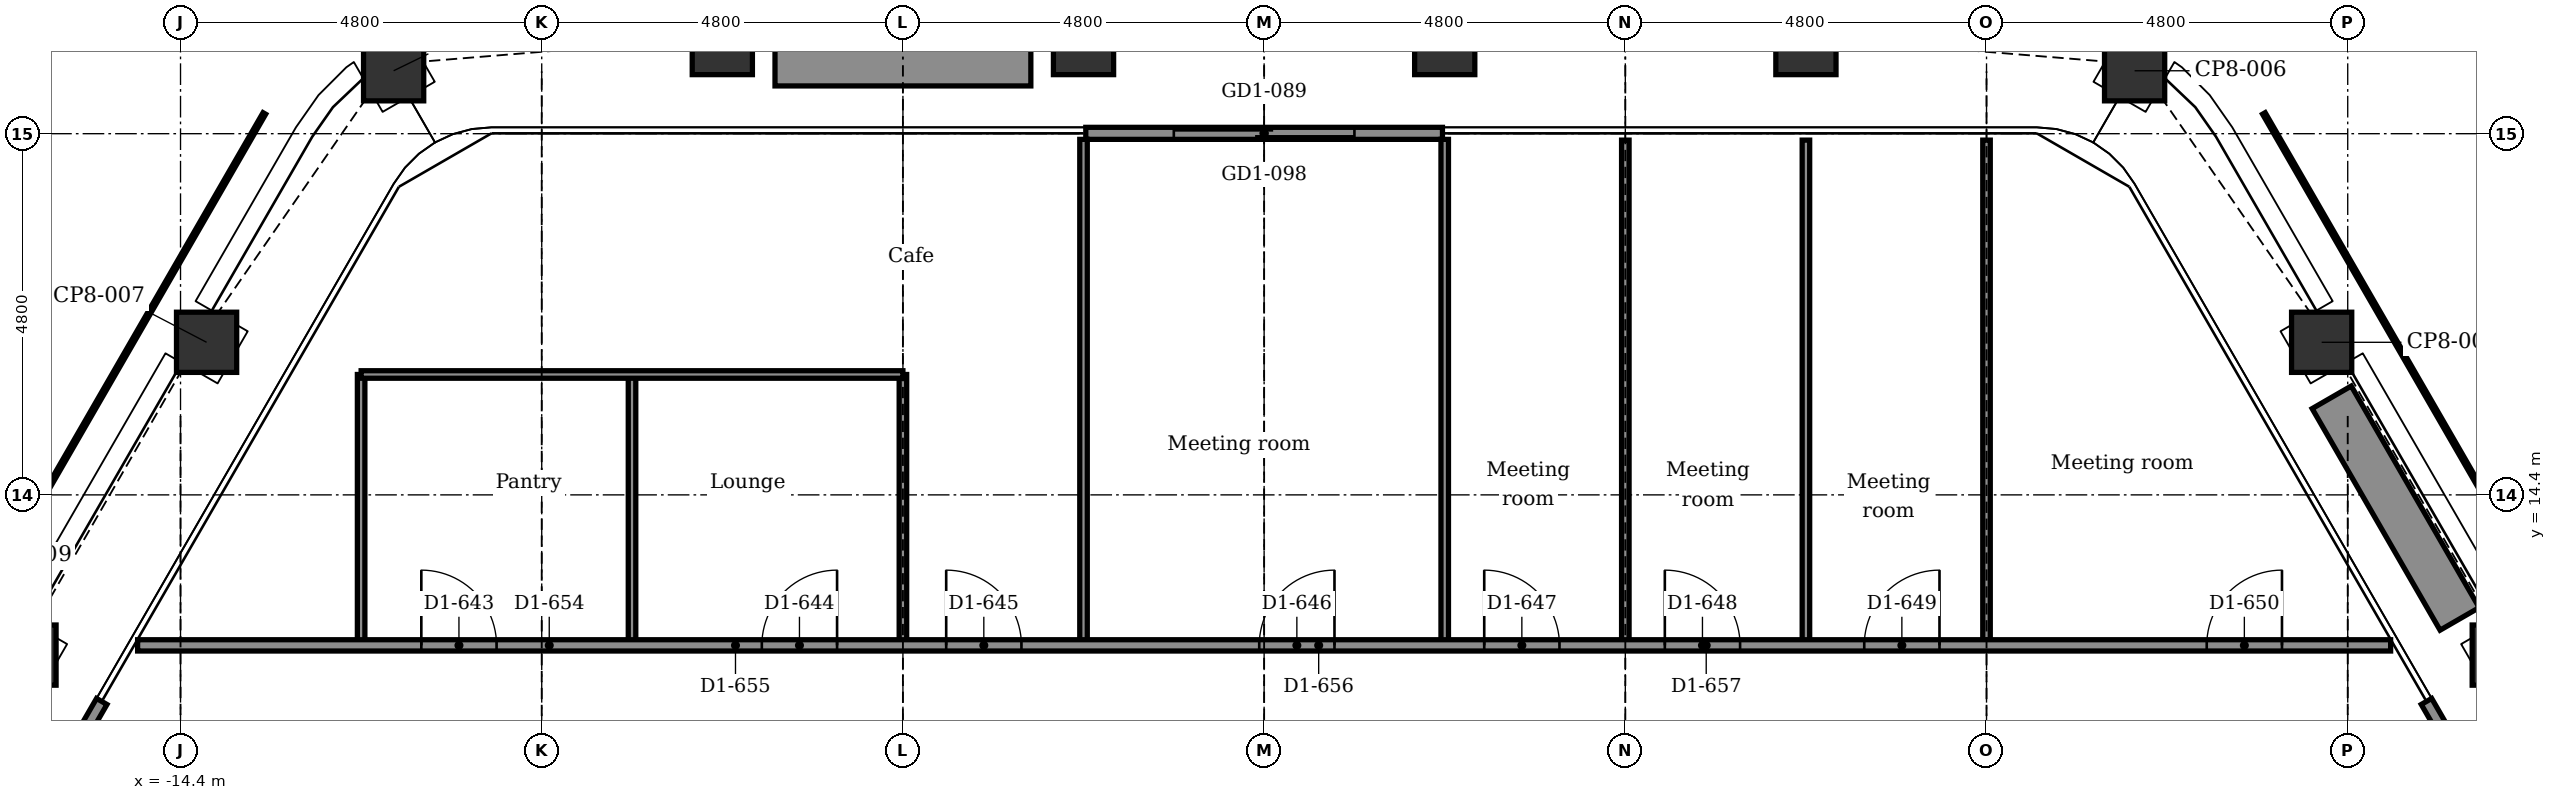
"""IFC4 building model, lengths in metres.
Left out: names, types, materials, properties, quantities, classifications, styles, units other than length and angle.
Written with IfcOpenShell. Run it as: python <this file> out.ifc"""

import sys

from ifc_helpers import new_model, si_unit, direction, frame, frame_2d, origin, origin_2d, place, context, subcontext, project, spatial, rectangle, extrude, element, fill, save


model = new_model("IFC4")
c1 = context("Model", 3, precision=1e-05, world=origin(), true_north=direction((0.0, 1.0)))
c2 = subcontext(c1, "Body", "Model", "MODEL_VIEW")
j1 = project(units=[si_unit("LENGTHUNIT", "METRE"), si_unit("PLANEANGLEUNIT", "RADIAN")], contexts=[c1])
p1 = place(None, origin())
s1 = spatial("IfcSite", under=j1, at=p1, CompositionType="ELEMENT")
p2 = place(p1, origin())
s2 = spatial("IfcBuilding", under=s1, at=p2, CompositionType="ELEMENT")
p3 = place(p2, frame((0.0, 0.0, 226.7)))
s3 = spatial("IfcBuildingStorey", under=s2, at=p3, CompositionType="ELEMENT", Elevation=226.7)
for number, where, z_axis, x_axis in (
    (1, (-11.568, 20.036, -0.15), (0.0, 0.0, 1.0), (0.866, 0.5, 0.0)),
    (2, (-7.2, 20.385, -0.15), (0.0, 0.0, 1.0), (1.0, 0.0, 0.0)),
    (3, (-2.4, 20.385, -0.15), (0.0, 0.0, 1.0), (1.0, 0.0, 0.0)),
    (4, (2.4, 20.385, -0.15), (0.0, 0.0, 1.0), (1.0, 0.0, 0.0)),
    (5, (7.2, 20.385, -0.15), (0.0, 0.0, 1.0), (1.0, 0.0, 0.0)),
    (6, (11.568, 20.036, -0.15), (0.0, 0.0, 1.0), (0.5, 0.866, 0.0)),
    (7, (14.054, 16.428, -0.15), (0.0, 0.0, 1.0), (0.866, 0.5, 0.0)),
    (8, (16.454, 12.271, -0.15), (0.0, 0.0, 1.0), (0.866, 0.5, 0.0)),
    (9, (-16.454, 12.271, -0.15), (0.0, 0.0, 1.0), (0.5, 0.866, 0.0)),
    (10, (-14.054, 16.428, -0.15), (0.0, 0.0, 1.0), (0.5, 0.866, 0.0)),
):
    element("IfcColumn", number, at=place(p3, frame(where, z_axis=z_axis, x_axis=x_axis)), inside=s3, PredefinedType="COLUMN", context=c2, shape_type="SweptSolid", body=[
        extrude(rectangle(XDim=0.8, YDim=0.8, at=origin_2d()), origin(), (0.0, 0.0, 1.0), 3.9),
    ])
p4 = place(p3, frame((-2.37, 19.205, 0.0), z_axis=(0.0, 0.0, 1.0), x_axis=(1.0, 0.0, 0.0)))
e11 = element("IfcWall", 11, at=p4, inside=s3, PredefinedType="PARTITIONING", context=c2, shape_type="SweptSolid", body=[
    extrude(rectangle(XDim=4.74, YDim=0.16, at=frame_2d((2.37, 0.0))), origin(), (0.0, 0.0, 1.0), 3.75),
])
p5 = place(p4, frame((1.17, 0.0, 0.0)))
e12 = element("IfcOpeningElement", 12, at=p5, cuts=e11, PredefinedType="OPENING", context=c2, shape_type="SweptSolid", body=[
    extrude(rectangle(XDim=2.4, YDim=2.4, at=frame_2d((1.2, 1.2))), frame((0.0, 0.09, 0.0), z_axis=(0.0, -1.0, 0.0), x_axis=(1.0, 0.0, 0.0)), (0.0, 0.0, 1.0), 0.18),
])
p6 = place(p3, frame((15.447, 11.655, 0.0), z_axis=(0.0, 0.0, 1.0), x_axis=(0.499978080042, -0.866038058908, 0.0)))
e13 = element("IfcWall", 13, at=p6, inside=s3, PredefinedType="PARTITIONING", context=c2, shape_type="SweptSolid", body=[
    extrude(rectangle(XDim=4.74, YDim=0.16, at=frame_2d((2.37, 0.0))), origin(), (0.0, 0.0, 1.0), 3.75),
])
p7 = place(p6, frame((1.17, 0.0, 0.0)))
e14 = element("IfcOpeningElement", 14, at=p7, cuts=e13, PredefinedType="OPENING", context=c2, shape_type="SweptSolid", body=[
    extrude(rectangle(XDim=2.4, YDim=2.4, at=frame_2d((1.2, 1.2))), frame((0.0, 0.09, 0.0), z_axis=(0.0, -1.0, 0.0), x_axis=(1.0, 0.0, 0.0)), (0.0, 0.0, 1.0), 0.18),
])
p8 = place(p3, frame((-17.817, 7.55, 0.0), z_axis=(0.0, 0.0, 1.0), x_axis=(0.499978080042, 0.866038058908, 0.0)))
e15 = element("IfcWall", 15, at=p8, inside=s3, PredefinedType="PARTITIONING", context=c2, shape_type="SweptSolid", body=[
    extrude(rectangle(XDim=4.74, YDim=0.16, at=frame_2d((2.37, 0.0))), origin(), (0.0, 0.0, 1.0), 3.75),
])
p9 = place(p8, frame((1.17, 0.0, 0.0)))
e16 = element("IfcOpeningElement", 16, at=p9, cuts=e15, PredefinedType="OPENING", context=c2, shape_type="SweptSolid", body=[
    extrude(rectangle(XDim=2.4, YDim=2.4, at=frame_2d((1.2, 1.2))), frame((0.0, 0.09, 0.0), z_axis=(0.0, -1.0, 0.0), x_axis=(1.0, 0.0, 0.0)), (0.0, 0.0, 1.0), 0.18),
])
p10 = place(p3, frame((-6.5, 20.135, 0.0), z_axis=(0.0, 0.0, 1.0), x_axis=(1.0, 0.0, 0.0)))
e17 = element("IfcWall", 17, at=p10, inside=s3, PredefinedType="USERDEFINED", context=c2, shape_type="SweptSolid", body=[
    extrude(rectangle(XDim=3.4, YDim=0.6, at=frame_2d((1.7, 0.0))), origin(), (0.0, 0.0, 1.0), 0.7),
])
p11 = place(p3, frame((14.187, 15.697, 0.0), z_axis=(0.0, 0.0, 1.0), x_axis=(0.499977295307, -0.866038511948, 0.0)))
e18 = element("IfcWall", 18, at=p11, inside=s3, PredefinedType="USERDEFINED", context=c2, shape_type="SweptSolid", body=[
    extrude(rectangle(XDim=3.4, YDim=0.6, at=frame_2d((1.7, 0.0))), origin(), (0.0, 0.0, 1.0), 0.7),
])
p12 = place(p3, frame((9.6, 12.4, 0.0), z_axis=(0.0, 0.0, 1.0), x_axis=(0.0, 1.0, 0.0)))
e19 = element("IfcWall", 19, at=p12, inside=s3, PredefinedType="PARTITIONING", context=c2, shape_type="SweptSolid", body=[
    extrude(rectangle(XDim=6.715, YDim=0.1, at=frame_2d((3.357, 0.0))), origin(), (0.0, 0.0, 1.0), 3.217),
])
p13 = place(p3, frame((7.2, 12.4, 0.0), z_axis=(0.0, 0.0, 1.0), x_axis=(0.0, 1.0, 0.0)))
e20 = element("IfcWall", 20, at=p13, inside=s3, PredefinedType="PARTITIONING", context=c2, shape_type="SweptSolid", body=[
    extrude(rectangle(XDim=6.715, YDim=0.1, at=frame_2d((3.357, 0.0))), origin(), (0.0, 0.0, 1.0), 3.75),
])
p14 = place(p3, frame((4.8, 12.4, 0.0), z_axis=(0.0, 0.0, 1.0), x_axis=(0.0, 1.0, 0.0)))
e21 = element("IfcWall", 21, at=p14, inside=s3, PredefinedType="PARTITIONING", context=c2, shape_type="SweptSolid", body=[
    extrude(rectangle(XDim=6.715, YDim=0.1, at=frame_2d((3.357, 0.0))), origin(), (0.0, 0.0, 1.0), 3.217),
])
for number, where, z_axis, x_axis in (
    (22, (2.4, 12.4, 0.0), (0.0, 0.0, 1.0), (0.0, 1.0, 0.0)),
    (23, (-2.4, 12.4, 0.0), (0.0, 0.0, 1.0), (0.0, 1.0, 0.0)),
):
    element("IfcWall", number, at=place(p3, frame(where, z_axis=z_axis, x_axis=x_axis)), inside=s3, PredefinedType="PARTITIONING", context=c2, shape_type="SweptSolid", body=[
        extrude(rectangle(XDim=6.725, YDim=0.1, at=frame_2d((3.362, 0.0))), origin(), (0.0, 0.0, 1.0), 3.75),
    ])
p15 = place(p3, frame((-4.8, 12.4, 0.0), z_axis=(0.0, 0.0, 1.0), x_axis=(0.0, 1.0, 0.0)))
e24 = element("IfcWall", 24, at=p15, inside=s3, PredefinedType="PARTITIONING", context=c2, shape_type="SweptSolid", body=[
    extrude(rectangle(XDim=3.6, YDim=0.1, at=frame_2d((1.8, 0.0))), origin(), (0.0, 0.0, 1.0), 3.217),
])
for number, where, z_axis, x_axis in (
    (25, (-8.4, 12.4, 0.0), (0.0, 0.0, 1.0), (0.0, 1.0, 0.0)),
    (26, (-12.0, 12.4, 0.0), (0.0, 0.0, 1.0), (0.0, 1.0, 0.0)),
):
    element("IfcWall", number, at=place(p3, frame(where, z_axis=z_axis, x_axis=x_axis)), inside=s3, PredefinedType="PARTITIONING", context=c2, shape_type="SweptSolid", body=[
        extrude(rectangle(XDim=3.6, YDim=0.1, at=frame_2d((1.8, 0.0))), origin(), (0.0, 0.0, 1.0), 3.75),
    ])
p16 = place(p3, frame((-14.97, 12.4, 0.0), z_axis=(0.0, 0.0, 1.0), x_axis=(1.0, 0.0, 0.0)))
e27 = element("IfcWall", 27, at=p16, inside=s3, PredefinedType="PARTITIONING", context=c2, shape_type="SweptSolid", body=[
    extrude(rectangle(XDim=29.94, YDim=0.15, at=frame_2d((14.97, 0.0))), origin(), (0.0, 0.0, 1.0), 3.75),
])
p17 = place(p16, frame((3.77, 0.0, 0.0)))
e28 = element("IfcOpeningElement", 28, at=p17, cuts=e27, PredefinedType="OPENING", context=c2, shape_type="SweptSolid", body=[
    extrude(rectangle(XDim=1.0, YDim=2.1, at=frame_2d((0.5, 1.05))), frame((0.0, 0.085, 0.0), z_axis=(0.0, -1.0, 0.0), x_axis=(1.0, 0.0, 0.0)), (0.0, 0.0, 1.0), 0.17),
])
p18 = place(p16, frame((8.295, 0.0, 0.0)))
e29 = element("IfcOpeningElement", 29, at=p18, cuts=e27, PredefinedType="OPENING", context=c2, shape_type="SweptSolid", body=[
    extrude(rectangle(XDim=1.0, YDim=2.1, at=frame_2d((0.5, 1.05))), frame((0.0, 0.085, 0.0), z_axis=(0.0, -1.0, 0.0), x_axis=(1.0, 0.0, 0.0)), (0.0, 0.0, 1.0), 0.17),
])
p19 = place(p16, frame((10.745, 0.0, 0.0)))
e30 = element("IfcOpeningElement", 30, at=p19, cuts=e27, PredefinedType="OPENING", context=c2, shape_type="SweptSolid", body=[
    extrude(rectangle(XDim=1.0, YDim=2.1, at=frame_2d((0.5, 1.05))), frame((0.0, 0.085, 0.0), z_axis=(0.0, -1.0, 0.0), x_axis=(1.0, 0.0, 0.0)), (0.0, 0.0, 1.0), 0.17),
])
p20 = place(p16, frame((14.905, 0.0, 0.0)))
e31 = element("IfcOpeningElement", 31, at=p20, cuts=e27, PredefinedType="OPENING", context=c2, shape_type="SweptSolid", body=[
    extrude(rectangle(XDim=1.0, YDim=2.1, at=frame_2d((0.5, 1.05))), frame((0.0, 0.085, 0.0), z_axis=(0.0, -1.0, 0.0), x_axis=(1.0, 0.0, 0.0)), (0.0, 0.0, 1.0), 0.17),
])
p21 = place(p16, frame((17.895, 0.0, 0.0)))
e32 = element("IfcOpeningElement", 32, at=p21, cuts=e27, PredefinedType="OPENING", context=c2, shape_type="SweptSolid", body=[
    extrude(rectangle(XDim=1.0, YDim=2.1, at=frame_2d((0.5, 1.05))), frame((0.0, 0.085, 0.0), z_axis=(0.0, -1.0, 0.0), x_axis=(1.0, 0.0, 0.0)), (0.0, 0.0, 1.0), 0.17),
])
p22 = place(p16, frame((20.295, 0.0, 0.0)))
e33 = element("IfcOpeningElement", 33, at=p22, cuts=e27, PredefinedType="OPENING", context=c2, shape_type="SweptSolid", body=[
    extrude(rectangle(XDim=1.0, YDim=2.1, at=frame_2d((0.5, 1.05))), frame((0.0, 0.085, 0.0), z_axis=(0.0, -1.0, 0.0), x_axis=(1.0, 0.0, 0.0)), (0.0, 0.0, 1.0), 0.17),
])
p23 = place(p16, frame((22.945, 0.0, 0.0)))
e34 = element("IfcOpeningElement", 34, at=p23, cuts=e27, PredefinedType="OPENING", context=c2, shape_type="SweptSolid", body=[
    extrude(rectangle(XDim=1.0, YDim=2.1, at=frame_2d((0.5, 1.05))), frame((0.0, 0.085, 0.0), z_axis=(0.0, -1.0, 0.0), x_axis=(1.0, 0.0, 0.0)), (0.0, 0.0, 1.0), 0.17),
])
p24 = place(p16, frame((27.497, 0.0, 0.0)))
e35 = element("IfcOpeningElement", 35, at=p24, cuts=e27, PredefinedType="OPENING", context=c2, shape_type="SweptSolid", body=[
    extrude(rectangle(XDim=1.0, YDim=2.1, at=frame_2d((0.5, 1.05))), frame((0.0, 0.085, 0.0), z_axis=(0.0, -1.0, 0.0), x_axis=(1.0, 0.0, 0.0)), (0.0, 0.0, 1.0), 0.17),
])
p25 = place(p3, frame((-12.0, 16.0, 0.0), z_axis=(0.0, 0.0, 1.0), x_axis=(1.0, 0.0, 0.0)))
e36 = element("IfcWall", 36, at=p25, inside=s3, PredefinedType="PARTITIONING", context=c2, shape_type="SweptSolid", body=[
    extrude(rectangle(XDim=7.2, YDim=0.1, at=frame_2d((3.6, 0.0))), origin(), (0.0, 0.0, 1.0), 3.75),
])
p26 = place(p5, origin())
e37 = element("IfcDoor", 37, at=p26, inside=s3, OperationType="DOUBLE_DOOR_SLIDING", PredefinedType="DOOR", context=c2, shape_type="SweptSolid", body=[
    extrude(rectangle(XDim=2.4, YDim=2.4, at=frame_2d((1.2, 1.2))), frame((0.0, 0.025, 0.0), z_axis=(0.0, -1.0, 0.0), x_axis=(1.0, 0.0, 0.0)), (0.0, 0.0, 1.0), 0.05),
])
fill(e12, e37)
p27 = place(p17, origin())
e38 = element("IfcDoor", 38, at=p27, inside=s3, OperationType="SINGLE_SWING_LEFT", PredefinedType="DOOR", context=c2, shape_type="SweptSolid", body=[
    extrude(rectangle(XDim=1.0, YDim=2.1, at=frame_2d((0.5, 1.05))), frame((0.0, 0.025, 0.0), z_axis=(0.0, -1.0, 0.0), x_axis=(1.0, 0.0, 0.0)), (0.0, 0.0, 1.0), 0.05),
])
fill(e28, e38)
p28 = place(p18, origin())
e39 = element("IfcDoor", 39, at=p28, inside=s3, OperationType="SINGLE_SWING_RIGHT", PredefinedType="DOOR", context=c2, shape_type="SweptSolid", body=[
    extrude(rectangle(XDim=1.0, YDim=2.1, at=frame_2d((0.5, 1.05))), frame((0.0, 0.025, 0.0), z_axis=(0.0, -1.0, 0.0), x_axis=(1.0, 0.0, 0.0)), (0.0, 0.0, 1.0), 0.05),
])
fill(e29, e39)
p29 = place(p19, origin())
e40 = element("IfcDoor", 40, at=p29, inside=s3, OperationType="SINGLE_SWING_LEFT", PredefinedType="DOOR", context=c2, shape_type="SweptSolid", body=[
    extrude(rectangle(XDim=1.0, YDim=2.1, at=frame_2d((0.5, 1.05))), frame((0.0, 0.025, 0.0), z_axis=(0.0, -1.0, 0.0), x_axis=(1.0, 0.0, 0.0)), (0.0, 0.0, 1.0), 0.05),
])
fill(e30, e40)
p30 = place(p20, origin())
e41 = element("IfcDoor", 41, at=p30, inside=s3, OperationType="SINGLE_SWING_RIGHT", PredefinedType="DOOR", context=c2, shape_type="SweptSolid", body=[
    extrude(rectangle(XDim=1.0, YDim=2.1, at=frame_2d((0.5, 1.05))), frame((0.0, 0.025, 0.0), z_axis=(0.0, -1.0, 0.0), x_axis=(1.0, 0.0, 0.0)), (0.0, 0.0, 1.0), 0.05),
])
fill(e31, e41)
p31 = place(p21, origin())
e42 = element("IfcDoor", 42, at=p31, inside=s3, OperationType="SINGLE_SWING_LEFT", PredefinedType="DOOR", context=c2, shape_type="SweptSolid", body=[
    extrude(rectangle(XDim=1.0, YDim=2.1, at=frame_2d((0.5, 1.05))), frame((0.0, 0.025, 0.0), z_axis=(0.0, -1.0, 0.0), x_axis=(1.0, 0.0, 0.0)), (0.0, 0.0, 1.0), 0.05),
])
fill(e32, e42)
p32 = place(p22, origin())
e43 = element("IfcDoor", 43, at=p32, inside=s3, OperationType="SINGLE_SWING_LEFT", PredefinedType="DOOR", context=c2, shape_type="SweptSolid", body=[
    extrude(rectangle(XDim=1.0, YDim=2.1, at=frame_2d((0.5, 1.05))), frame((0.0, 0.025, 0.0), z_axis=(0.0, -1.0, 0.0), x_axis=(1.0, 0.0, 0.0)), (0.0, 0.0, 1.0), 0.05),
])
fill(e33, e43)
p33 = place(p23, origin())
e44 = element("IfcDoor", 44, at=p33, inside=s3, OperationType="SINGLE_SWING_RIGHT", PredefinedType="DOOR", context=c2, shape_type="SweptSolid", body=[
    extrude(rectangle(XDim=1.0, YDim=2.1, at=frame_2d((0.5, 1.05))), frame((0.0, 0.025, 0.0), z_axis=(0.0, -1.0, 0.0), x_axis=(1.0, 0.0, 0.0)), (0.0, 0.0, 1.0), 0.05),
])
fill(e34, e44)
p34 = place(p24, origin())
e45 = element("IfcDoor", 45, at=p34, inside=s3, OperationType="SINGLE_SWING_RIGHT", PredefinedType="DOOR", context=c2, shape_type="SweptSolid", body=[
    extrude(rectangle(XDim=1.0, YDim=2.1, at=frame_2d((0.5, 1.05))), frame((0.0, 0.025, 0.0), z_axis=(0.0, -1.0, 0.0), x_axis=(1.0, 0.0, 0.0)), (0.0, 0.0, 1.0), 0.05),
])
fill(e35, e45)
save(model, sys.argv[1])
